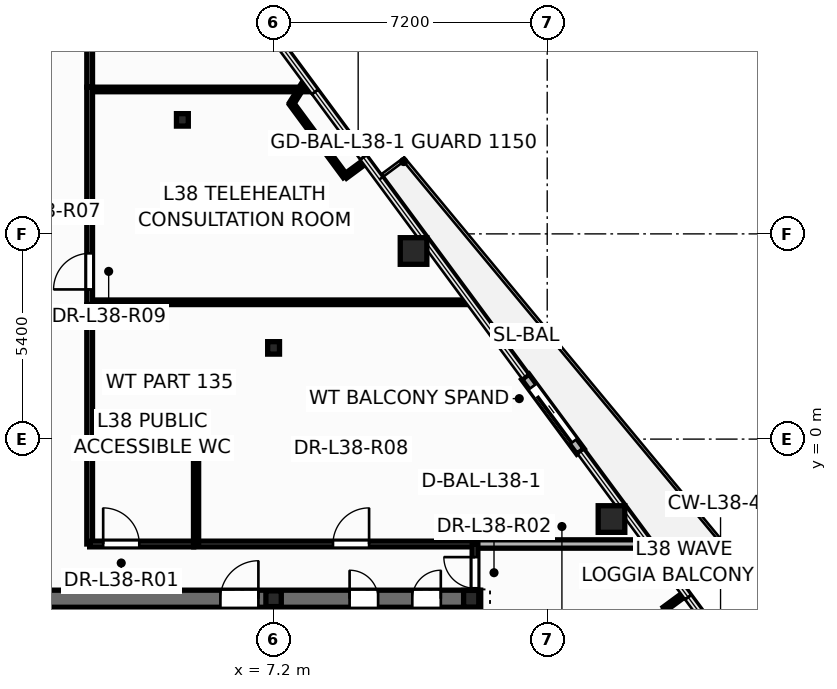
"""IFC4 building model, lengths in metres.
Left out: names, types, materials, properties, quantities, classifications, styles, units other than length and angle.
Written with IfcOpenShell. Run it as: python <this file> out.ifc"""

import sys

from ifc_helpers import new_model, si_unit, direction, frame, frame_2d, origin, origin_2d, place, context, subcontext, project, spatial, rectangle, hollow_circle, i_section, extrude, element, fill, save


model = new_model("IFC4")
c1 = context("Model", 3, precision=1e-05, world=origin(), true_north=direction((0.0, 1.0)))
c2 = subcontext(c1, "Body", "Model", "MODEL_VIEW")
j1 = project(units=[si_unit("LENGTHUNIT", "METRE"), si_unit("PLANEANGLEUNIT", "RADIAN")], contexts=[c1])
p1 = place(None, origin())
s1 = spatial("IfcSite", under=j1, at=p1, CompositionType="ELEMENT")
p2 = place(p1, origin())
s2 = spatial("IfcBuilding", under=s1, at=p2, CompositionType="ELEMENT")
p3 = place(p2, frame((0.0, 0.0, 147.3)))
s3 = spatial("IfcBuildingStorey", under=s2, at=p3, CompositionType="ELEMENT", Elevation=147.3)
for number, where, z_axis, x_axis in (
    (1, (16.092, -2.103, 0.0), (0.0, 0.0, 1.0), (1.0, 0.0, 0.0)),
    (2, (10.883, 4.95, 0.0), (0.0, 0.0, 1.0), (1.0, 0.0, 0.0)),
):
    element("IfcColumn", number, at=place(p3, frame(where, z_axis=z_axis, x_axis=x_axis)), inside=s3, PredefinedType="COLUMN", context=c2, shape_type="SweptSolid", body=[
        extrude(hollow_circle(Radius=0.35, WallThickness=0.03, at=origin_2d()), origin(), (0.0, 0.0, 1.0), 3.6),
    ])
p4 = place(p3, frame((12.4, -4.2, 0.0), z_axis=(0.0, 0.0, 1.0), x_axis=(1.0, 0.0, 0.0)))
e3 = element("IfcColumn", 3, at=p4, inside=s3, PredefinedType="COLUMN", context=c2, shape_type="SweptSolid", body=[
    extrude(i_section(OverallWidth=0.4, OverallDepth=0.44, WebThickness=0.028, FlangeThickness=0.04, at=origin_2d()), origin(), (0.0, 0.0, 1.0), 3.6),
])
p5 = place(p3, frame((7.2, -4.2, 0.0), z_axis=(0.0, 0.0, 1.0), x_axis=(1.0, 0.0, 0.0)))
e4 = element("IfcColumn", 4, at=p5, inside=s3, PredefinedType="PILASTER", context=c2, shape_type="SweptSolid", body=[
    extrude(i_section(OverallWidth=0.405, OverallDepth=0.414, WebThickness=0.022, FlangeThickness=0.032, at=origin_2d()), origin(), (0.0, 0.0, 1.0), 3.6),
])
for number, where, z_axis, x_axis in (
    (5, (7.2, 2.4, 0.0), (0.0, 0.0, 1.0), (1.0, 0.0, 0.0)),
    (6, (4.8, 8.4, 0.0), (0.0, 0.0, 1.0), (1.0, 0.0, 0.0)),
):
    element("IfcColumn", number, at=place(p3, frame(where, z_axis=z_axis, x_axis=x_axis)), inside=s3, PredefinedType="COLUMN", context=c2, shape_type="SweptSolid", body=[
        extrude(i_section(OverallWidth=0.311, OverallDepth=0.327, WebThickness=0.016, FlangeThickness=0.025, at=origin_2d()), origin(), (0.0, 0.0, 1.0), 3.6),
    ])
p6 = place(p3, frame((15.275, -0.324, -0.015), z_axis=(0.0, 0.0, 1.0), x_axis=(-0.594092829232, 0.804396488216, 0.0)))
e7 = element("IfcWall", 7, at=p6, inside=s3, PredefinedType="STANDARD", context=c2, shape_type="SweptSolid", body=[
    extrude(rectangle(XDim=2.44, YDim=0.24, at=frame_2d((1.22, 0.0))), origin(), (0.0, 0.0, 1.0), 2.807),
])
p7 = place(p6, frame((0.32, 0.0, 0.015)))
e8 = element("IfcOpeningElement", 8, at=p7, cuts=e7, PredefinedType="OPENING", context=c2, shape_type="SweptSolid", body=[
    extrude(rectangle(XDim=1.806, YDim=2.204, at=frame_2d((0.9, 1.102))), frame((0.0, 0.13, 0.0), z_axis=(0.0, -1.0, 0.0), x_axis=(1.0, 0.0, 0.0)), (0.0, 0.0, 1.0), 0.26),
])
p8 = place(p3, frame((10.2, -5.52, 0.0), z_axis=(0.0, 0.0, 1.0), x_axis=(0.0, 1.0, 0.0)))
e9 = element("IfcWall", 9, at=p8, inside=s3, PredefinedType="PARTITIONING", context=c2, shape_type="SweptSolid", body=[
    extrude(rectangle(XDim=1.12, YDim=0.12, at=frame_2d((0.56, 0.0))), origin(), (0.0, 0.0, 1.0), 3.35),
])
p9 = place(p3, frame((-12.65, -4.2, 0.0), z_axis=(0.0, 0.0, 1.0), x_axis=(1.0, 0.0, 0.0)))
e10 = element("IfcWall", 10, at=p9, inside=s3, PredefinedType="SHEAR", context=c2, shape_type="SweptSolid", body=[
    extrude(rectangle(XDim=25.3, YDim=0.45, at=frame_2d((12.65, 0.0))), origin(), (0.0, 0.0, 1.0), 3.6),
])
p10 = place(p9, frame((0.95, 0.0, 0.0)))
e11 = element("IfcOpeningElement", 11, at=p10, cuts=e10, PredefinedType="OPENING", context=c2, shape_type="SweptSolid", body=[
    extrude(rectangle(XDim=0.756, YDim=2.054, at=frame_2d((0.375, 1.027))), frame((0.0, 0.235, 0.0), z_axis=(0.0, -1.0, 0.0), x_axis=(1.0, 0.0, 0.0)), (0.0, 0.0, 1.0), 0.47),
])
p11 = place(p9, frame((2.6, 0.0, 0.0)))
e12 = element("IfcOpeningElement", 12, at=p11, cuts=e10, PredefinedType="OPENING", context=c2, shape_type="SweptSolid", body=[
    extrude(rectangle(XDim=0.756, YDim=2.054, at=frame_2d((0.375, 1.027))), frame((0.0, 0.235, 0.0), z_axis=(0.0, -1.0, 0.0), x_axis=(1.0, 0.0, 0.0)), (0.0, 0.0, 1.0), 0.47),
])
p12 = place(p9, frame((21.85, 0.0, 0.0)))
e13 = element("IfcOpeningElement", 13, at=p12, cuts=e10, PredefinedType="OPENING", context=c2, shape_type="SweptSolid", body=[
    extrude(rectangle(XDim=0.756, YDim=2.054, at=frame_2d((0.375, 1.027))), frame((0.0, 0.235, 0.0), z_axis=(0.0, -1.0, 0.0), x_axis=(1.0, 0.0, 0.0)), (0.0, 0.0, 1.0), 0.47),
])
p13 = place(p9, frame((23.5, 0.0, 0.0)))
e14 = element("IfcOpeningElement", 14, at=p13, cuts=e10, PredefinedType="OPENING", context=c2, shape_type="SweptSolid", body=[
    extrude(rectangle(XDim=0.756, YDim=2.054, at=frame_2d((0.375, 1.027))), frame((0.0, 0.235, 0.0), z_axis=(0.0, -1.0, 0.0), x_axis=(1.0, 0.0, 0.0)), (0.0, 0.0, 1.0), 0.47),
])
p14 = place(p9, frame((5.85, 0.0, 0.0)))
e15 = element("IfcOpeningElement", 15, at=p14, cuts=e10, PredefinedType="OPENING", context=c2, shape_type="SweptSolid", body=[
    extrude(rectangle(XDim=1.006, YDim=2.104, at=frame_2d((0.5, 1.052))), frame((0.0, 0.235, 0.0), z_axis=(0.0, -1.0, 0.0), x_axis=(1.0, 0.0, 0.0)), (0.0, 0.0, 1.0), 0.47),
])
p15 = place(p9, frame((10.35, 0.0, 0.0)))
e16 = element("IfcOpeningElement", 16, at=p15, cuts=e10, PredefinedType="OPENING", context=c2, shape_type="SweptSolid", body=[
    extrude(rectangle(XDim=1.406, YDim=2.154, at=frame_2d((0.7, 1.077))), frame((0.0, 0.235, 0.0), z_axis=(0.0, -1.0, 0.0), x_axis=(1.0, 0.0, 0.0)), (0.0, 0.0, 1.0), 0.47),
])
p16 = place(p9, frame((18.45, 0.0, 0.0)))
e17 = element("IfcOpeningElement", 17, at=p16, cuts=e10, PredefinedType="OPENING", context=c2, shape_type="SweptSolid", body=[
    extrude(rectangle(XDim=1.006, YDim=2.104, at=frame_2d((0.5, 1.052))), frame((0.0, 0.235, 0.0), z_axis=(0.0, -1.0, 0.0), x_axis=(1.0, 0.0, 0.0)), (0.0, 0.0, 1.0), 0.47),
])
p17 = place(p3, frame((8.48, -13.85, 0.0), z_axis=(0.0, 0.0, 1.0), x_axis=(0.0, 1.0, 0.0)))
e18 = element("IfcWall", 18, at=p17, inside=s3, PredefinedType="SHEAR", context=c2, shape_type="SweptSolid", body=[
    extrude(rectangle(XDim=9.4, YDim=0.25, at=frame_2d((4.7, 0.0))), origin(), (0.0, 0.0, 1.0), 3.6),
])
p18 = place(p17, frame((6.95, 0.0, 0.0)))
e19 = element("IfcOpeningElement", 19, at=p18, cuts=e18, PredefinedType="OPENING", context=c2, shape_type="SweptSolid", body=[
    extrude(rectangle(XDim=1.006, YDim=2.104, at=frame_2d((0.5, 1.052))), frame((0.0, 0.135, 0.0), z_axis=(0.0, -1.0, 0.0), x_axis=(1.0, 0.0, 0.0)), (0.0, 0.0, 1.0), 0.27),
])
p19 = place(p3, frame((5.12, -13.85, 0.0), z_axis=(0.0, 0.0, 1.0), x_axis=(0.0, 1.0, 0.0)))
e20 = element("IfcWall", 20, at=p19, inside=s3, PredefinedType="SHEAR", context=c2, shape_type="SweptSolid", body=[
    extrude(rectangle(XDim=9.4, YDim=0.25, at=frame_2d((4.7, 0.0))), origin(), (0.0, 0.0, 1.0), 3.6),
])
p20 = place(p3, frame((12.4, -13.85, 0.0), z_axis=(0.0, 0.0, 1.0), x_axis=(0.0, 1.0, 0.0)))
e21 = element("IfcWall", 21, at=p20, inside=s3, PredefinedType="SHEAR", context=c2, shape_type="SweptSolid", body=[
    extrude(rectangle(XDim=9.4, YDim=0.45, at=frame_2d((4.7, 0.0))), origin(), (0.0, 0.0, 1.0), 3.6),
])
p21 = place(p3, frame((2.88, -9.45, 0.0), z_axis=(0.0, 0.0, 1.0), x_axis=(0.0, 1.0, 0.0)))
e22 = element("IfcWall", 22, at=p21, inside=s3, PredefinedType="SOLIDWALL", context=c2, shape_type="SweptSolid", body=[
    extrude(rectangle(XDim=5.0, YDim=0.2, at=frame_2d((2.5, 0.0))), origin(), (0.0, 0.0, 1.0), 3.35),
])
p22 = place(p21, frame((0.7, 0.0, 0.0)))
e23 = element("IfcOpeningElement", 23, at=p22, cuts=e22, PredefinedType="OPENING", context=c2, shape_type="SweptSolid", body=[
    extrude(rectangle(XDim=1.106, YDim=2.104, at=frame_2d((0.55, 1.052))), frame((0.0, 0.11, 0.0), z_axis=(0.0, -1.0, 0.0), x_axis=(1.0, 0.0, 0.0)), (0.0, 0.0, 1.0), 0.22),
])
p23 = place(p21, frame((3.15, 0.0, 0.0)))
e24 = element("IfcOpeningElement", 24, at=p23, cuts=e22, PredefinedType="OPENING", context=c2, shape_type="SweptSolid", body=[
    extrude(rectangle(XDim=1.106, YDim=2.104, at=frame_2d((0.55, 1.052))), frame((0.0, 0.11, 0.0), z_axis=(0.0, -1.0, 0.0), x_axis=(1.0, 0.0, 0.0)), (0.0, 0.0, 1.0), 0.22),
])
p24 = place(p3, frame((2.36, 3.6, 0.0), z_axis=(0.0, 0.0, 1.0), x_axis=(1.0, 0.0, 0.0)))
e25 = element("IfcWall", 25, at=p24, inside=s3, PredefinedType="PARTITIONING", context=c2, shape_type="SweptSolid", body=[
    extrude(rectangle(XDim=10.017, YDim=0.12, at=frame_2d((5.008, 0.0))), origin(), (0.0, 0.0, 1.0), 2.617),
])
p25 = place(p3, frame((5.1, -2.76, 0.0), z_axis=(0.0, 0.0, 1.0), x_axis=(1.0, 0.0, 0.0)))
e26 = element("IfcWall", 26, at=p25, inside=s3, PredefinedType="PARTITIONING", context=c2, shape_type="SweptSolid", body=[
    extrude(rectangle(XDim=7.4, YDim=0.15, at=frame_2d((3.7, 0.0))), origin(), (0.0, 0.0, 1.0), 2.325),
])
p26 = place(p25, frame((3.663, 0.0, 0.0)))
e27 = element("IfcOpeningElement", 27, at=p26, cuts=e26, PredefinedType="OPENING", context=c2, shape_type="SweptSolid", body=[
    extrude(rectangle(XDim=0.956, YDim=2.104, at=frame_2d((0.475, 1.052))), frame((0.0, 0.085, 0.0), z_axis=(0.0, -1.0, 0.0), x_axis=(1.0, 0.0, 0.0)), (0.0, 0.0, 1.0), 0.17),
])
p27 = place(p3, frame((2.36, 9.2, 0.0), z_axis=(0.0, 0.0, 1.0), x_axis=(1.0, 0.0, 0.0)))
e28 = element("IfcWall", 28, at=p27, inside=s3, PredefinedType="PARTITIONING", context=c2, shape_type="SweptSolid", body=[
    extrude(rectangle(XDim=5.76, YDim=0.12, at=frame_2d((2.88, 0.0))), origin(), (0.0, 0.0, 1.0), 2.617),
])
p28 = place(p3, frame((2.36, 3.54, 0.0), z_axis=(0.0, 0.0, 1.0), x_axis=(0.0, 1.0, 0.0)))
e29 = element("IfcWall", 29, at=p28, inside=s3, PredefinedType="PARTITIONING", context=c2, shape_type="SweptSolid", body=[
    extrude(rectangle(XDim=5.72, YDim=0.15, at=frame_2d((2.86, 0.0))), origin(), (0.0, 0.0, 1.0), 2.617),
])
p29 = place(p28, frame((0.398, 0.0, 0.0)))
e30 = element("IfcOpeningElement", 30, at=p29, cuts=e29, PredefinedType="OPENING", context=c2, shape_type="SweptSolid", body=[
    extrude(rectangle(XDim=0.956, YDim=2.104, at=frame_2d((0.475, 1.052))), frame((0.0, 0.085, 0.0), z_axis=(0.0, -1.0, 0.0), x_axis=(1.0, 0.0, 0.0)), (0.0, 0.0, 1.0), 0.17),
])
p30 = place(p3, frame((12.5, -2.76, 0.0), z_axis=(0.0, 0.0, 1.0), x_axis=(1.0, 0.0, 0.0)))
e31 = element("IfcWall", 31, at=p30, inside=s3, PredefinedType="PARTITIONING", context=c2, shape_type="SweptSolid", body=[
    extrude(rectangle(XDim=4.574, YDim=0.22, at=frame_2d((2.287, 0.0))), origin(), (0.0, 0.0, 1.0), 2.792),
])
p31 = place(p3, frame((2.36, -2.76, 0.0), z_axis=(0.0, 0.0, 1.0), x_axis=(0.0, 1.0, 0.0)))
e32 = element("IfcWall", 32, at=p31, inside=s3, PredefinedType="PARTITIONING", context=c2, shape_type="SweptSolid", body=[
    extrude(rectangle(XDim=6.298, YDim=0.15, at=frame_2d((3.149, 0.0))), origin(), (0.0, 0.0, 1.0), 2.325),
])
p32 = place(p3, frame((2.36, -2.76, 0.0), z_axis=(0.0, 0.0, 1.0), x_axis=(1.0, 0.0, 0.0)))
e33 = element("IfcWall", 33, at=p32, inside=s3, PredefinedType="PARTITIONING", context=c2, shape_type="SweptSolid", body=[
    extrude(rectangle(XDim=2.738, YDim=0.15, at=frame_2d((1.369, 0.0))), origin(), (0.0, 0.0, 1.0), 2.918),
])
p33 = place(p32, frame((0.356, 0.0, 0.0)))
e34 = element("IfcOpeningElement", 34, at=p33, cuts=e33, PredefinedType="OPENING", context=c2, shape_type="SweptSolid", body=[
    extrude(rectangle(XDim=0.956, YDim=2.104, at=frame_2d((0.475, 1.052))), frame((0.0, 0.085, 0.0), z_axis=(0.0, -1.0, 0.0), x_axis=(1.0, 0.0, 0.0)), (0.0, 0.0, 1.0), 0.17),
])
p34 = place(p3, frame((2.36, -0.14, 0.0), z_axis=(0.0, 0.0, 1.0), x_axis=(1.0, 0.0, 0.0)))
e35 = element("IfcWall", 35, at=p34, inside=s3, PredefinedType="PARTITIONING", context=c2, shape_type="SweptSolid", body=[
    extrude(rectangle(XDim=2.8, YDim=0.135, at=frame_2d((1.4, 0.0))), origin(), (0.0, 0.0, 1.0), 2.918),
])
p35 = place(p3, frame((2.36, 9.262, 0.0), z_axis=(0.0, 0.0, 1.0), x_axis=(0.0, 1.0, 0.0)))
e36 = element("IfcWall", 36, at=p35, inside=s3, PredefinedType="PARTITIONING", context=c2, shape_type="SweptSolid", body=[
    extrude(rectangle(XDim=2.538, YDim=0.15, at=frame_2d((1.269, 0.0))), origin(), (0.0, 0.0, 1.0), 3.35),
])
p36 = place(p3, frame((5.16, -2.76, 0.0), z_axis=(0.0, 0.0, 1.0), x_axis=(0.0, 1.0, 0.0)))
e37 = element("IfcWall", 37, at=p36, inside=s3, PredefinedType="PARTITIONING", context=c2, shape_type="SweptSolid", body=[
    extrude(rectangle(XDim=2.62, YDim=0.135, at=frame_2d((1.31, 0.0))), origin(), (0.0, 0.0, 1.0), 3.35),
])
for number, where, z_axis, x_axis in (
    (38, (9.084, 6.914, 0.0), (0.0, 0.0, 1.0), (-0.594, 0.804, 0.0)),
    (39, (18.903, -6.381, 0.0), (0.0, 0.0, 1.0), (-0.594, 0.804, 0.0)),
):
    element("IfcWall", number, at=place(p3, frame(where, z_axis=z_axis, x_axis=x_axis)), inside=s3, PredefinedType="PARTITIONING", context=c2, shape_type="SweptSolid", body=[
        extrude(rectangle(XDim=2.378, YDim=0.12, at=frame_2d((1.189, 0.0))), origin(), (0.0, 0.0, 1.0), 3.35),
    ])
p37 = place(p3, frame((12.5, -4.24, 0.0), z_axis=(0.0, 0.0, 1.0), x_axis=(0.0, 1.0, 0.0)))
e40 = element("IfcWall", 40, at=p37, inside=s3, PredefinedType="PARTITIONING", context=c2, shape_type="SweptSolid", body=[
    extrude(rectangle(XDim=1.48, YDim=0.15, at=frame_2d((0.74, 0.0))), origin(), (0.0, 0.0, 1.0), 2.325),
])
p38 = place(p37, frame((0.315, 0.0, 0.0)))
e41 = element("IfcOpeningElement", 41, at=p38, cuts=e40, PredefinedType="OPENING", context=c2, shape_type="SweptSolid", body=[
    extrude(rectangle(XDim=0.826, YDim=2.104, at=frame_2d((0.41, 1.052))), frame((0.0, 0.085, 0.0), z_axis=(0.0, -1.0, 0.0), x_axis=(1.0, 0.0, 0.0)), (0.0, 0.0, 1.0), 0.17),
])
p39 = place(p3, frame((7.671, 8.827, 0.0), z_axis=(0.0, 0.0, 1.0), x_axis=(0.531553111266, 0.847024964156, 0.0)))
e42 = element("IfcWall", 42, at=p39, inside=s3, PredefinedType="PARTITIONING", context=c2, shape_type="SweptSolid", body=[
    extrude(rectangle(XDim=0.72, YDim=0.12, at=frame_2d((0.36, 0.0))), origin(), (0.0, 0.0, 1.0), 2.792),
])
for number, where, z_axis, x_axis in (
    (43, (9.623, 7.312, 0.0), (0.0, 0.0, 1.0), (-0.804, -0.594, 0.0)),
    (44, (17.49, -4.468, 0.0), (0.0, 0.0, 1.0), (0.805, 0.594, 0.0)),
):
    element("IfcWall", number, at=place(p3, frame(where, z_axis=z_axis, x_axis=x_axis)), inside=s3, PredefinedType="PARTITIONING", context=c2, shape_type="SweptSolid", body=[
        extrude(rectangle(XDim=0.67, YDim=0.12, at=frame_2d((0.335, 0.0))), origin(), (0.0, 0.0, 1.0), 2.792),
    ])
p40 = place(p7, origin())
e45 = element("IfcDoor", 45, at=p40, inside=s3, OperationType="SLIDING_TO_LEFT", PredefinedType="DOOR", context=c2, shape_type="SweptSolid", body=[
    extrude(rectangle(XDim=1.8, YDim=2.2, at=frame_2d((0.9, 1.1))), frame((0.0, 0.025, 0.0), z_axis=(0.0, -1.0, 0.0), x_axis=(1.0, 0.0, 0.0)), (0.0, 0.0, 1.0), 0.05),
])
fill(e8, e45)
p41 = place(p12, origin())
e46 = element("IfcDoor", 46, at=p41, inside=s3, OperationType="SINGLE_SWING_LEFT", PredefinedType="DOOR", context=c2, shape_type="SweptSolid", body=[
    extrude(rectangle(XDim=0.75, YDim=2.05, at=frame_2d((0.375, 1.025))), frame((0.0, 0.025, 0.0), z_axis=(0.0, -1.0, 0.0), x_axis=(1.0, 0.0, 0.0)), (0.0, 0.0, 1.0), 0.05),
])
fill(e13, e46)
p42 = place(p13, origin())
e47 = element("IfcDoor", 47, at=p42, inside=s3, OperationType="SINGLE_SWING_RIGHT", PredefinedType="DOOR", context=c2, shape_type="SweptSolid", body=[
    extrude(rectangle(XDim=0.75, YDim=2.05, at=frame_2d((0.375, 1.025))), frame((0.0, 0.025, 0.0), z_axis=(0.0, -1.0, 0.0), x_axis=(1.0, 0.0, 0.0)), (0.0, 0.0, 1.0), 0.05),
])
fill(e14, e47)
p43 = place(p16, origin())
e48 = element("IfcDoor", 48, at=p43, inside=s3, OperationType="SINGLE_SWING_RIGHT", PredefinedType="DOOR", context=c2, shape_type="SweptSolid", body=[
    extrude(rectangle(XDim=1.0, YDim=2.1, at=frame_2d((0.5, 1.05))), frame((0.0, 0.025, 0.0), z_axis=(0.0, -1.0, 0.0), x_axis=(1.0, 0.0, 0.0)), (0.0, 0.0, 1.0), 0.05),
])
fill(e17, e48)
p44 = place(p33, origin())
e49 = element("IfcDoor", 49, at=p44, inside=s3, OperationType="SINGLE_SWING_LEFT", PredefinedType="DOOR", context=c2, shape_type="SweptSolid", body=[
    extrude(rectangle(XDim=0.95, YDim=2.1, at=frame_2d((0.475, 1.05))), frame((0.0, 0.025, 0.0), z_axis=(0.0, -1.0, 0.0), x_axis=(1.0, 0.0, 0.0)), (0.0, 0.0, 1.0), 0.05),
])
fill(e34, e49)
p45 = place(p38, origin())
e50 = element("IfcDoor", 50, at=p45, inside=s3, OperationType="SINGLE_SWING_RIGHT", PredefinedType="DOOR", context=c2, shape_type="SweptSolid", body=[
    extrude(rectangle(XDim=0.82, YDim=2.1, at=frame_2d((0.41, 1.05))), frame((0.0, 0.025, 0.0), z_axis=(0.0, -1.0, 0.0), x_axis=(1.0, 0.0, 0.0)), (0.0, 0.0, 1.0), 0.05),
])
fill(e41, e50)
p46 = place(p26, origin())
e51 = element("IfcDoor", 51, at=p46, inside=s3, OperationType="SINGLE_SWING_RIGHT", PredefinedType="DOOR", context=c2, shape_type="SweptSolid", body=[
    extrude(rectangle(XDim=0.95, YDim=2.1, at=frame_2d((0.475, 1.05))), frame((0.0, 0.025, 0.0), z_axis=(0.0, -1.0, 0.0), x_axis=(1.0, 0.0, 0.0)), (0.0, 0.0, 1.0), 0.05),
])
fill(e27, e51)
p47 = place(p29, origin())
e52 = element("IfcDoor", 52, at=p47, inside=s3, OperationType="SINGLE_SWING_LEFT", PredefinedType="DOOR", context=c2, shape_type="SweptSolid", body=[
    extrude(rectangle(XDim=0.95, YDim=2.1, at=frame_2d((0.475, 1.05))), frame((0.0, 0.025, 0.0), z_axis=(0.0, -1.0, 0.0), x_axis=(1.0, 0.0, 0.0)), (0.0, 0.0, 1.0), 0.05),
])
fill(e30, e52)
save(model, sys.argv[1])
